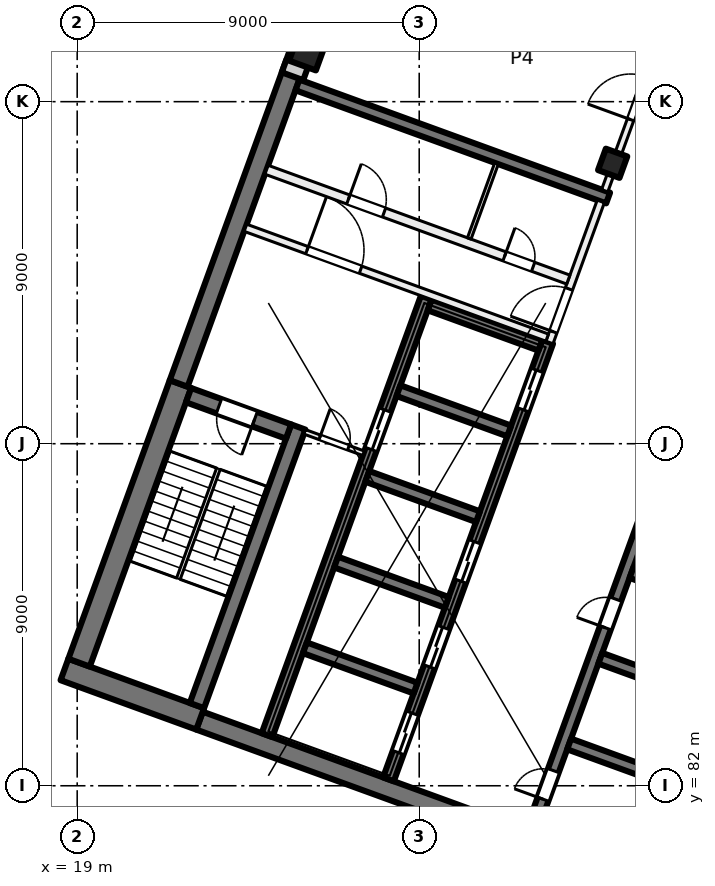
"""IFC4 building model, lengths in metres.
Left out: names, types, materials, properties, quantities, classifications, styles, units other than length and angle.
Written with IfcOpenShell. Run it as: python <this file> out.ifc"""

import sys

from ifc_helpers import new_model, si_unit, direction, frame, frame_2d, origin, origin_2d, place, context, subcontext, project, spatial, rectangle, extrude, element, fill, save


model = new_model("IFC4")
c1 = context("Model", 3, precision=1e-05, world=origin(), true_north=direction((0.0, 1.0)))
c2 = subcontext(c1, "Body", "Model", "MODEL_VIEW")
j1 = project(units=[si_unit("LENGTHUNIT", "METRE"), si_unit("PLANEANGLEUNIT", "RADIAN")], contexts=[c1])
p1 = place(None, origin())
s1 = spatial("IfcSite", under=j1, at=p1, CompositionType="ELEMENT")
p2 = place(p1, origin())
s2 = spatial("IfcBuilding", under=s1, at=p2, CompositionType="ELEMENT")
p3 = place(p2, frame((0.0, 0.0, 208.0)))
s3 = spatial("IfcBuildingStorey", under=s2, at=p3, CompositionType="ELEMENT", Elevation=208.0)
p4 = place(p3, frame((33.091, 98.379, 0.0), z_axis=(0.0, 0.0, 1.0), x_axis=(-0.342020143326, -0.939692620786, 0.0)))
e1 = element("IfcColumn", 1, at=p4, inside=s3, PredefinedType="COLUMN", context=c2, shape_type="SweptSolid", body=[
    extrude(rectangle(XDim=0.6, YDim=0.6, at=origin_2d()), origin(), (0.0, 0.0, 1.0), 4.0),
])
p5 = place(p3, frame((25.056, 101.303, 0.0), z_axis=(0.0, 0.0, 1.0), x_axis=(-0.342020143326, -0.939692620786, 0.0)))
e2 = element("IfcColumn", 2, at=p5, inside=s3, PredefinedType="COLUMN", context=c2, shape_type="SweptSolid", body=[
    extrude(rectangle(XDim=0.75, YDim=0.75, at=origin_2d()), origin(), (0.0, 0.0, 1.0), 4.0),
])
p6 = place(p3, frame((35.75, 78.788, 0.0), z_axis=(0.0, 0.0, 1.0), x_axis=(-0.939692894512, 0.342019391267, 0.0)))
e3 = element("IfcWall", 3, at=p6, inside=s3, PredefinedType="SHEAR", context=c2, shape_type="SweptSolid", body=[
    extrude(rectangle(XDim=14.4, YDim=0.5, at=frame_2d((7.2, 0.0))), origin(), (0.0, 0.0, 1.0), 4.0),
])
p7 = place(p3, frame((22.236, 83.76, 0.0), z_axis=(0.0, 0.0, 1.0), x_axis=(-0.939680822529, 0.342052557032, 0.0)))
e4 = element("IfcWall", 4, at=p7, inside=s3, PredefinedType="SHEAR", context=c2, shape_type="SweptSolid", body=[
    extrude(rectangle(XDim=3.8, YDim=0.6, at=frame_2d((1.9, 0.0))), origin(), (0.0, 0.0, 1.0), 4.0),
])
p8 = place(p3, frame((19.05, 85.239, 0.0), z_axis=(0.0, 0.0, 1.0), x_axis=(0.342016982193, 0.939693771338, 0.0)))
e5 = element("IfcWall", 5, at=p8, inside=s3, PredefinedType="SHEAR", context=c2, shape_type="SweptSolid", body=[
    extrude(rectangle(XDim=7.8, YDim=0.6, at=frame_2d((3.9, 0.0))), origin(), (0.0, 0.0, 1.0), 4.0),
])
p9 = place(p3, frame((21.67, 92.585, 0.0), z_axis=(0.0, 0.0, 1.0), x_axis=(0.342035714298, 0.93968695327, 0.0)))
e6 = element("IfcWall", 6, at=p9, inside=s3, PredefinedType="SHEAR", context=c2, shape_type="SweptSolid", body=[
    extrude(rectangle(XDim=8.975, YDim=0.5, at=frame_2d((4.488, 0.0))), origin(), (0.0, 0.0, 1.0), 4.0),
])
p10 = place(p3, frame((22.15, 84.11, 0.0), z_axis=(0.0, 0.0, 1.0), x_axis=(0.342016982193, 0.939693771338, 0.0)))
e7 = element("IfcWall", 7, at=p10, inside=s3, PredefinedType="SHEAR", context=c2, shape_type="SweptSolid", body=[
    extrude(rectangle(XDim=7.8, YDim=0.4, at=frame_2d((3.9, 0.0))), origin(), (0.0, 0.0, 1.0), 4.0),
])
p11 = place(p3, frame((24.562, 91.32, 0.0), z_axis=(0.0, 0.0, 1.0), x_axis=(-0.939717030584, 0.341953070509, 0.0)))
e8 = element("IfcWall", 8, at=p11, inside=s3, PredefinedType="SHEAR", context=c2, shape_type="SweptSolid", body=[
    extrude(rectangle(XDim=2.8, YDim=0.4, at=frame_2d((1.4, 0.0))), origin(), (0.0, 0.0, 1.0), 4.0),
])
p12 = place(p11, frame((0.95, 0.0, 0.0)))
e9 = element("IfcOpeningElement", 9, at=p12, cuts=e8, PredefinedType="OPENING", context=c2, shape_type="SweptSolid", body=[
    extrude(rectangle(XDim=1.0, YDim=2.1, at=frame_2d((0.5, 1.05))), frame((0.0, 0.21, 0.0), z_axis=(0.0, -1.0, 0.0), x_axis=(1.0, 0.0, 0.0)), (0.0, 0.0, 1.0), 0.42),
])
p13 = place(p3, frame((30.949, 80.801, 0.0), z_axis=(0.0, 0.0, 1.0), x_axis=(0.342016684409, 0.939693879721, 0.0)))
e10 = element("IfcWall", 10, at=p13, inside=s3, PredefinedType="SHEAR", context=c2, shape_type="SweptSolid", body=[
    extrude(rectangle(XDim=12.25, YDim=0.3, at=frame_2d((6.125, 0.0))), origin(), (0.0, 0.0, 1.0), 4.0),
])
p14 = place(p13, frame((0.9, 0.0, 0.0)))
e11 = element("IfcOpeningElement", 11, at=p14, cuts=e10, PredefinedType="OPENING", context=c2, shape_type="SweptSolid", body=[
    extrude(rectangle(XDim=0.8, YDim=2.1, at=frame_2d((0.4, 1.05))), frame((0.0, 0.16, 0.0), z_axis=(0.0, -1.0, 0.0), x_axis=(1.0, 0.0, 0.0)), (0.0, 0.0, 1.0), 0.32),
])
p15 = place(p13, frame((5.7, 0.0, 0.0)))
e12 = element("IfcOpeningElement", 12, at=p15, cuts=e10, PredefinedType="OPENING", context=c2, shape_type="SweptSolid", body=[
    extrude(rectangle(XDim=0.8, YDim=2.1, at=frame_2d((0.4, 1.05))), frame((0.0, 0.16, 0.0), z_axis=(0.0, -1.0, 0.0), x_axis=(1.0, 0.0, 0.0)), (0.0, 0.0, 1.0), 0.32),
])
p16 = place(p3, frame((34.858, 82.039, 0.0), z_axis=(0.0, 0.0, 1.0), x_axis=(-0.939689908313, 0.342027595692, 0.0)))
e13 = element("IfcWall", 13, at=p16, inside=s3, PredefinedType="SHEAR", context=c2, shape_type="SweptSolid", body=[
    extrude(rectangle(XDim=3.1, YDim=0.3, at=frame_2d((1.55, 0.0))), origin(), (0.0, 0.0, 1.0), 4.0),
])
p17 = place(p3, frame((35.679, 84.294, 0.0), z_axis=(0.0, 0.0, 1.0), x_axis=(-0.939706007505, 0.341983361377, 0.0)))
e14 = element("IfcWall", 14, at=p17, inside=s3, PredefinedType="SHEAR", context=c2, shape_type="SweptSolid", body=[
    extrude(rectangle(XDim=3.1, YDim=0.3, at=frame_2d((1.55, 0.0))), origin(), (0.0, 0.0, 1.0), 4.0),
])
p18 = place(p3, frame((36.5, 86.549, 0.0), z_axis=(0.0, 0.0, 1.0), x_axis=(-0.939689908313, 0.342027595692, 0.0)))
e15 = element("IfcWall", 15, at=p18, inside=s3, PredefinedType="SHEAR", context=c2, shape_type="SweptSolid", body=[
    extrude(rectangle(XDim=3.1, YDim=0.3, at=frame_2d((1.55, 0.0))), origin(), (0.0, 0.0, 1.0), 4.0),
])
p19 = place(p3, frame((27.191, 82.169, 0.0), z_axis=(0.0, 0.0, 1.0), x_axis=(0.342016684409, 0.939693879721, 0.0)))
e16 = element("IfcWall", 16, at=p19, inside=s3, PredefinedType="SHEAR", context=c2, shape_type="SweptSolid", body=[
    extrude(rectangle(XDim=12.25, YDim=0.3, at=frame_2d((6.125, 0.0))), origin(), (0.0, 0.0, 1.0), 4.0),
])
p20 = place(p19, frame((0.75, 0.0, 0.0)))
e17 = element("IfcOpeningElement", 17, at=p20, cuts=e16, PredefinedType="OPENING", context=c2, shape_type="SweptSolid", body=[
    extrude(rectangle(XDim=1.1, YDim=2.1, at=frame_2d((0.55, 1.05))), frame((0.0, 0.16, 0.0), z_axis=(0.0, -1.0, 0.0), x_axis=(1.0, 0.0, 0.0)), (0.0, 0.0, 1.0), 0.32),
])
p21 = place(p19, frame((3.15, 0.0, 0.0)))
e18 = element("IfcOpeningElement", 18, at=p21, cuts=e16, PredefinedType="OPENING", context=c2, shape_type="SweptSolid", body=[
    extrude(rectangle(XDim=1.1, YDim=2.1, at=frame_2d((0.55, 1.05))), frame((0.0, 0.16, 0.0), z_axis=(0.0, -1.0, 0.0), x_axis=(1.0, 0.0, 0.0)), (0.0, 0.0, 1.0), 0.32),
])
p22 = place(p19, frame((5.55, 0.0, 0.0)))
e19 = element("IfcOpeningElement", 19, at=p22, cuts=e16, PredefinedType="OPENING", context=c2, shape_type="SweptSolid", body=[
    extrude(rectangle(XDim=1.1, YDim=2.1, at=frame_2d((0.55, 1.05))), frame((0.0, 0.16, 0.0), z_axis=(0.0, -1.0, 0.0), x_axis=(1.0, 0.0, 0.0)), (0.0, 0.0, 1.0), 0.32),
])
p23 = place(p19, frame((10.35, 0.0, 0.0)))
e20 = element("IfcOpeningElement", 20, at=p23, cuts=e16, PredefinedType="OPENING", context=c2, shape_type="SweptSolid", body=[
    extrude(rectangle(XDim=1.1, YDim=2.1, at=frame_2d((0.55, 1.05))), frame((0.0, 0.16, 0.0), z_axis=(0.0, -1.0, 0.0), x_axis=(1.0, 0.0, 0.0)), (0.0, 0.0, 1.0), 0.32),
])
p24 = place(p3, frame((23.996, 83.332, 0.0), z_axis=(0.0, 0.0, 1.0), x_axis=(0.342016684409, 0.939693879721, 0.0)))
e21 = element("IfcWall", 21, at=p24, inside=s3, PredefinedType="SHEAR", context=c2, shape_type="SweptSolid", body=[
    extrude(rectangle(XDim=12.25, YDim=0.3, at=frame_2d((6.125, 0.0))), origin(), (0.0, 0.0, 1.0), 4.0),
])
p25 = place(p24, frame((8.0, 0.0, 0.0)))
e22 = element("IfcOpeningElement", 22, at=p25, cuts=e21, PredefinedType="OPENING", context=c2, shape_type="SweptSolid", body=[
    extrude(rectangle(XDim=1.1, YDim=2.1, at=frame_2d((0.55, 1.05))), frame((0.0, 0.16, 0.0), z_axis=(0.0, -1.0, 0.0), x_axis=(1.0, 0.0, 0.0)), (0.0, 0.0, 1.0), 0.32),
])
for number, where, z_axis, x_axis in (
    (23, (27.905, 84.57, 0.0), (0.0, 0.0, 1.0), (-0.94, 0.342, 0.0)),
    (24, (28.726, 86.825, 0.0), (0.0, 0.0, 1.0), (-0.94, 0.342, 0.0)),
    (25, (29.546, 89.08, 0.0), (0.0, 0.0, 1.0), (-0.94, 0.342, 0.0)),
):
    element("IfcWall", number, at=place(p3, frame(where, z_axis=z_axis, x_axis=x_axis)), inside=s3, PredefinedType="SHEAR", context=c2, shape_type="SweptSolid", body=[
        extrude(rectangle(XDim=3.1, YDim=0.3, at=frame_2d((1.55, 0.0))), origin(), (0.0, 0.0, 1.0), 4.0),
    ])
for number, where, z_axis, x_axis in (
    (26, (30.367, 91.336, 0.0), (0.0, 0.0, 1.0), (-0.94, 0.342, 0.0)),
    (27, (31.188, 93.591, 0.0), (0.0, 0.0, 1.0), (-0.94, 0.342, 0.0)),
):
    element("IfcWall", number, at=place(p3, frame(where, z_axis=z_axis, x_axis=x_axis)), inside=s3, PredefinedType="SHEAR", context=c2, shape_type="SweptSolid", body=[
        extrude(rectangle(XDim=3.1, YDim=0.3, at=frame_2d((1.55, 0.0))), origin(), (0.0, 0.0, 1.0), 4.0),
    ])
p26 = place(p3, frame((32.971, 97.465, 0.0), z_axis=(0.0, 0.0, 1.0), x_axis=(-0.939695066972, 0.34201342241, 0.0)))
e28 = element("IfcWall", 28, at=p26, inside=s3, PredefinedType="SHEAR", context=c2, shape_type="SweptSolid", body=[
    extrude(rectangle(XDim=8.7, YDim=0.3, at=frame_2d((4.35, 0.0))), origin(), (0.0, 0.0, 1.0), 4.0),
])
p27 = place(p3, frame((24.666, 100.669, 0.0), z_axis=(0.0, 0.0, 1.0), x_axis=(0.34201964167, 0.939692803373, 0.0)))
e29 = element("IfcWall", 29, at=p27, inside=s3, PredefinedType="SOLIDWALL", context=c2, shape_type="SweptSolid", body=[
    extrude(rectangle(XDim=32.884, YDim=0.6, at=frame_2d((16.442, 0.0))), origin(), (0.0, 0.0, 1.0), 3.625),
])
p28 = place(p27, frame((1.48, 0.0, 0.9)))
e30 = element("IfcOpeningElement", 30, at=p28, cuts=e29, PredefinedType="OPENING", context=c2, shape_type="SweptSolid", body=[
    extrude(rectangle(XDim=3.0, YDim=2.4, at=frame_2d((1.5, 1.2))), frame((0.0, 0.31, 0.0), z_axis=(0.0, -1.0, 0.0), x_axis=(1.0, 0.0, 0.0)), (0.0, 0.0, 1.0), 0.62),
])
p29 = place(p27, frame((5.98, 0.0, 0.9)))
e31 = element("IfcOpeningElement", 31, at=p29, cuts=e29, PredefinedType="OPENING", context=c2, shape_type="SweptSolid", body=[
    extrude(rectangle(XDim=3.0, YDim=2.4, at=frame_2d((1.5, 1.2))), frame((0.0, 0.31, 0.0), z_axis=(0.0, -1.0, 0.0), x_axis=(1.0, 0.0, 0.0)), (0.0, 0.0, 1.0), 0.62),
])
p30 = place(p27, frame((10.48, 0.0, 0.9)))
e32 = element("IfcOpeningElement", 32, at=p30, cuts=e29, PredefinedType="OPENING", context=c2, shape_type="SweptSolid", body=[
    extrude(rectangle(XDim=3.0, YDim=2.4, at=frame_2d((1.5, 1.2))), frame((0.0, 0.31, 0.0), z_axis=(0.0, -1.0, 0.0), x_axis=(1.0, 0.0, 0.0)), (0.0, 0.0, 1.0), 0.62),
])
p31 = place(p27, frame((14.98, 0.0, 0.9)))
e33 = element("IfcOpeningElement", 33, at=p31, cuts=e29, PredefinedType="OPENING", context=c2, shape_type="SweptSolid", body=[
    extrude(rectangle(XDim=3.0, YDim=2.4, at=frame_2d((1.5, 1.2))), frame((0.0, 0.31, 0.0), z_axis=(0.0, -1.0, 0.0), x_axis=(1.0, 0.0, 0.0)), (0.0, 0.0, 1.0), 0.62),
])
p32 = place(p27, frame((19.48, 0.0, 0.9)))
e34 = element("IfcOpeningElement", 34, at=p32, cuts=e29, PredefinedType="OPENING", context=c2, shape_type="SweptSolid", body=[
    extrude(rectangle(XDim=3.0, YDim=2.4, at=frame_2d((1.5, 1.2))), frame((0.0, 0.31, 0.0), z_axis=(0.0, -1.0, 0.0), x_axis=(1.0, 0.0, 0.0)), (0.0, 0.0, 1.0), 0.62),
])
p33 = place(p27, frame((23.98, 0.0, 0.9)))
e35 = element("IfcOpeningElement", 35, at=p33, cuts=e29, PredefinedType="OPENING", context=c2, shape_type="SweptSolid", body=[
    extrude(rectangle(XDim=3.0, YDim=2.4, at=frame_2d((1.5, 1.2))), frame((0.0, 0.31, 0.0), z_axis=(0.0, -1.0, 0.0), x_axis=(1.0, 0.0, 0.0)), (0.0, 0.0, 1.0), 0.62),
])
p34 = place(p27, frame((28.48, 0.0, 0.9)))
e36 = element("IfcOpeningElement", 36, at=p34, cuts=e29, PredefinedType="OPENING", context=c2, shape_type="SweptSolid", body=[
    extrude(rectangle(XDim=3.0, YDim=2.4, at=frame_2d((1.5, 1.2))), frame((0.0, 0.31, 0.0), z_axis=(0.0, -1.0, 0.0), x_axis=(1.0, 0.0, 0.0)), (0.0, 0.0, 1.0), 0.62),
])
p35 = place(p3, frame((31.427, 93.663, 0.0), z_axis=(0.0, 0.0, 1.0), x_axis=(0.342030870568, 0.93968871632, 0.0)))
e37 = element("IfcWall", 37, at=p35, inside=s3, PredefinedType="PARTITIONING", context=c2, shape_type="SweptSolid", body=[
    extrude(rectangle(XDim=3.95, YDim=0.2, at=frame_2d((1.975, 0.0))), origin(), (0.0, 0.0, 1.0), 3.625),
])
p36 = place(p35, frame((0.3, 0.0, 0.0)))
e38 = element("IfcOpeningElement", 38, at=p36, cuts=e37, PredefinedType="OPENING", context=c2, shape_type="SweptSolid", body=[
    extrude(rectangle(XDim=1.2, YDim=2.1, at=frame_2d((0.6, 1.05))), frame((0.0, 0.11, 0.0), z_axis=(0.0, -1.0, 0.0), x_axis=(1.0, 0.0, 0.0)), (0.0, 0.0, 1.0), 0.22),
])
p37 = place(p3, frame((23.427, 96.682, 0.0), z_axis=(0.0, 0.0, 1.0), x_axis=(0.939690465531, -0.342026064782, 0.0)))
e39 = element("IfcWall", 39, at=p37, inside=s3, PredefinedType="PARTITIONING", context=c2, shape_type="SweptSolid", body=[
    extrude(rectangle(XDim=8.45, YDim=0.2, at=frame_2d((4.225, 0.0))), origin(), (0.0, 0.0, 1.0), 3.625),
])
p38 = place(p37, frame((1.725, 0.0, 0.0)))
e40 = element("IfcOpeningElement", 40, at=p38, cuts=e39, PredefinedType="OPENING", context=c2, shape_type="SweptSolid", body=[
    extrude(rectangle(XDim=1.5, YDim=2.1, at=frame_2d((0.75, 1.05))), frame((0.0, 0.11, 0.0), z_axis=(0.0, -1.0, 0.0), x_axis=(1.0, 0.0, 0.0)), (0.0, 0.0, 1.0), 0.22),
])
p39 = place(p3, frame((23.983, 98.208, 0.0), z_axis=(0.0, 0.0, 1.0), x_axis=(0.939699751196, -0.342000552051, 0.0)))
e41 = element("IfcWall", 41, at=p39, inside=s3, PredefinedType="PARTITIONING", context=c2, shape_type="SweptSolid", body=[
    extrude(rectangle(XDim=8.45, YDim=0.25, at=frame_2d((4.225, 0.0))), origin(), (0.0, 0.0, 1.0), 3.625),
])
p40 = place(p39, frame((6.665, 0.0, 0.0)))
e42 = element("IfcOpeningElement", 42, at=p40, cuts=e41, PredefinedType="OPENING", context=c2, shape_type="SweptSolid", body=[
    extrude(rectangle(XDim=0.8, YDim=2.1, at=frame_2d((0.4, 1.05))), frame((0.0, 0.135, 0.0), z_axis=(0.0, -1.0, 0.0), x_axis=(1.0, 0.0, 0.0)), (0.0, 0.0, 1.0), 0.27),
])
p41 = place(p39, frame((2.29, 0.0, 0.0)))
e43 = element("IfcOpeningElement", 43, at=p41, cuts=e41, PredefinedType="OPENING", context=c2, shape_type="SweptSolid", body=[
    extrude(rectangle(XDim=1.0, YDim=2.1, at=frame_2d((0.5, 1.05))), frame((0.0, 0.135, 0.0), z_axis=(0.0, -1.0, 0.0), x_axis=(1.0, 0.0, 0.0)), (0.0, 0.0, 1.0), 0.27),
])
p42 = place(p3, frame((24.985, 91.312, 0.0), z_axis=(0.0, 0.0, 1.0), x_axis=(0.939719959755, -0.341945020783, 0.0)))
e44 = element("IfcWall", 44, at=p42, inside=s3, PredefinedType="PARTITIONING", context=c2, shape_type="SweptSolid", body=[
    extrude(rectangle(XDim=1.65, YDim=0.125, at=frame_2d((0.825, 0.0))), origin(), (0.0, 0.0, 1.0), 3.625),
])
p43 = place(p42, frame((0.425, 0.0, 0.0)))
e45 = element("IfcOpeningElement", 45, at=p43, cuts=e44, PredefinedType="OPENING", context=c2, shape_type="SweptSolid", body=[
    extrude(rectangle(XDim=0.8, YDim=2.1, at=frame_2d((0.4, 1.05))), frame((0.0, 0.073, 0.0), z_axis=(0.0, -1.0, 0.0), x_axis=(1.0, 0.0, 0.0)), (0.0, 0.0, 1.0), 0.145),
])
p44 = place(p3, frame((29.316, 96.4, 0.0), z_axis=(0.0, 0.0, 1.0), x_axis=(0.342023078919, 0.939691552312, 0.0)))
e46 = element("IfcWall", 46, at=p44, inside=s3, PredefinedType="PARTITIONING", context=c2, shape_type="SweptSolid", body=[
    extrude(rectangle(XDim=2.1, YDim=0.1, at=frame_2d((1.05, 0.0))), origin(), (0.0, 0.0, 1.0), 3.625),
])
p45 = place(p3, frame((32.881, 97.657, 0.0), z_axis=(0.0, 0.0, 1.0), x_axis=(0.342058204353, 0.939678766832, 0.0)))
e47 = element("IfcWall", 47, at=p45, inside=s3, PredefinedType="PARTITIONING", context=c2, shape_type="SweptSolid", body=[
    extrude(rectangle(XDim=5.163, YDim=0.175, at=frame_2d((2.581, 0.0))), origin(), (0.0, 0.0, 1.0), 3.625),
])
p46 = place(p45, frame((1.991, 0.0, 0.0)))
e48 = element("IfcOpeningElement", 48, at=p46, cuts=e47, PredefinedType="OPENING", context=c2, shape_type="SweptSolid", body=[
    extrude(rectangle(XDim=1.2, YDim=2.1, at=frame_2d((0.6, 1.05))), frame((0.0, 0.097, 0.0), z_axis=(0.0, -1.0, 0.0), x_axis=(1.0, 0.0, 0.0)), (0.0, 0.0, 1.0), 0.195),
])
p47 = place(p20, origin())
e49 = element("IfcDoor", 49, at=p47, inside=s3, OperationType="DOUBLE_DOOR_SLIDING", PredefinedType="DOOR", context=c2, shape_type="SweptSolid", body=[
    extrude(rectangle(XDim=1.1, YDim=2.1, at=frame_2d((0.55, 1.05))), frame((0.0, 0.025, 0.0), z_axis=(0.0, -1.0, 0.0), x_axis=(1.0, 0.0, 0.0)), (0.0, 0.0, 1.0), 0.05),
])
fill(e17, e49)
p48 = place(p21, origin())
e50 = element("IfcDoor", 50, at=p48, inside=s3, OperationType="DOUBLE_DOOR_SLIDING", PredefinedType="DOOR", context=c2, shape_type="SweptSolid", body=[
    extrude(rectangle(XDim=1.1, YDim=2.1, at=frame_2d((0.55, 1.05))), frame((0.0, 0.025, 0.0), z_axis=(0.0, -1.0, 0.0), x_axis=(1.0, 0.0, 0.0)), (0.0, 0.0, 1.0), 0.05),
])
fill(e18, e50)
p49 = place(p22, origin())
e51 = element("IfcDoor", 51, at=p49, inside=s3, OperationType="DOUBLE_DOOR_SLIDING", PredefinedType="DOOR", context=c2, shape_type="SweptSolid", body=[
    extrude(rectangle(XDim=1.1, YDim=2.1, at=frame_2d((0.55, 1.05))), frame((0.0, 0.025, 0.0), z_axis=(0.0, -1.0, 0.0), x_axis=(1.0, 0.0, 0.0)), (0.0, 0.0, 1.0), 0.05),
])
fill(e19, e51)
p50 = place(p23, origin())
e52 = element("IfcDoor", 52, at=p50, inside=s3, OperationType="DOUBLE_DOOR_SLIDING", PredefinedType="DOOR", context=c2, shape_type="SweptSolid", body=[
    extrude(rectangle(XDim=1.1, YDim=2.1, at=frame_2d((0.55, 1.05))), frame((0.0, 0.025, 0.0), z_axis=(0.0, -1.0, 0.0), x_axis=(1.0, 0.0, 0.0)), (0.0, 0.0, 1.0), 0.05),
])
fill(e20, e52)
p51 = place(p14, origin())
e53 = element("IfcDoor", 53, at=p51, inside=s3, OperationType="SINGLE_SWING_LEFT", PredefinedType="DOOR", context=c2, shape_type="SweptSolid", body=[
    extrude(rectangle(XDim=0.8, YDim=2.1, at=frame_2d((0.4, 1.05))), frame((0.0, 0.025, 0.0), z_axis=(0.0, -1.0, 0.0), x_axis=(1.0, 0.0, 0.0)), (0.0, 0.0, 1.0), 0.05),
])
fill(e11, e53)
p52 = place(p15, origin())
e54 = element("IfcDoor", 54, at=p52, inside=s3, OperationType="SINGLE_SWING_RIGHT", PredefinedType="DOOR", context=c2, shape_type="SweptSolid", body=[
    extrude(rectangle(XDim=0.8, YDim=2.1, at=frame_2d((0.4, 1.05))), frame((0.0, 0.025, 0.0), z_axis=(0.0, -1.0, 0.0), x_axis=(1.0, 0.0, 0.0)), (0.0, 0.0, 1.0), 0.05),
])
fill(e12, e54)
p53 = place(p36, origin())
e55 = element("IfcDoor", 55, at=p53, inside=s3, OperationType="DOUBLE_DOOR_SINGLE_SWING", PredefinedType="DOOR", context=c2, shape_type="SweptSolid", body=[
    extrude(rectangle(XDim=1.2, YDim=2.1, at=frame_2d((0.6, 1.05))), frame((0.0, 0.025, 0.0), z_axis=(0.0, -1.0, 0.0), x_axis=(1.0, 0.0, 0.0)), (0.0, 0.0, 1.0), 0.05),
])
fill(e38, e55)
p54 = place(p38, origin())
e56 = element("IfcDoor", 56, at=p54, inside=s3, OperationType="DOUBLE_DOOR_SINGLE_SWING", PredefinedType="DOOR", context=c2, shape_type="SweptSolid", body=[
    extrude(rectangle(XDim=1.5, YDim=2.1, at=frame_2d((0.75, 1.05))), frame((0.0, 0.025, 0.0), z_axis=(0.0, -1.0, 0.0), x_axis=(1.0, 0.0, 0.0)), (0.0, 0.0, 1.0), 0.05),
])
fill(e40, e56)
p55 = place(p12, origin())
e57 = element("IfcDoor", 57, at=p55, inside=s3, OperationType="SINGLE_SWING_LEFT", PredefinedType="DOOR", context=c2, shape_type="SweptSolid", body=[
    extrude(rectangle(XDim=1.0, YDim=2.1, at=frame_2d((0.5, 1.05))), frame((0.0, 0.025, 0.0), z_axis=(0.0, -1.0, 0.0), x_axis=(1.0, 0.0, 0.0)), (0.0, 0.0, 1.0), 0.05),
])
fill(e9, e57)
p56 = place(p43, origin())
e58 = element("IfcDoor", 58, at=p56, inside=s3, OperationType="SINGLE_SWING_RIGHT", PredefinedType="DOOR", context=c2, shape_type="SweptSolid", body=[
    extrude(rectangle(XDim=0.8, YDim=2.1, at=frame_2d((0.4, 1.05))), frame((0.0, 0.025, 0.0), z_axis=(0.0, -1.0, 0.0), x_axis=(1.0, 0.0, 0.0)), (0.0, 0.0, 1.0), 0.05),
])
fill(e45, e58)
p57 = place(p40, origin())
e59 = element("IfcDoor", 59, at=p57, inside=s3, OperationType="SINGLE_SWING_LEFT", PredefinedType="DOOR", context=c2, shape_type="SweptSolid", body=[
    extrude(rectangle(XDim=0.8, YDim=2.1, at=frame_2d((0.4, 1.05))), frame((0.0, 0.025, 0.0), z_axis=(0.0, -1.0, 0.0), x_axis=(1.0, 0.0, 0.0)), (0.0, 0.0, 1.0), 0.05),
])
fill(e42, e59)
p58 = place(p41, origin())
e60 = element("IfcDoor", 60, at=p58, inside=s3, OperationType="SINGLE_SWING_RIGHT", PredefinedType="DOOR", context=c2, shape_type="SweptSolid", body=[
    extrude(rectangle(XDim=1.0, YDim=2.1, at=frame_2d((0.5, 1.05))), frame((0.0, 0.025, 0.0), z_axis=(0.0, -1.0, 0.0), x_axis=(1.0, 0.0, 0.0)), (0.0, 0.0, 1.0), 0.05),
])
fill(e43, e60)
p59 = place(p25, origin())
e61 = element("IfcDoor", 61, at=p59, inside=s3, OperationType="DOUBLE_DOOR_SLIDING", PredefinedType="DOOR", context=c2, shape_type="SweptSolid", body=[
    extrude(rectangle(XDim=1.1, YDim=2.1, at=frame_2d((0.55, 1.05))), frame((0.0, 0.025, 0.0), z_axis=(0.0, -1.0, 0.0), x_axis=(1.0, 0.0, 0.0)), (0.0, 0.0, 1.0), 0.05),
])
fill(e22, e61)
p60 = place(p46, origin())
e62 = element("IfcDoor", 62, at=p60, inside=s3, OperationType="DOUBLE_DOOR_SINGLE_SWING", PredefinedType="DOOR", context=c2, shape_type="SweptSolid", body=[
    extrude(rectangle(XDim=1.2, YDim=2.1, at=frame_2d((0.6, 1.05))), frame((0.0, 0.025, 0.0), z_axis=(0.0, -1.0, 0.0), x_axis=(1.0, 0.0, 0.0)), (0.0, 0.0, 1.0), 0.05),
])
fill(e48, e62)
save(model, sys.argv[1])
